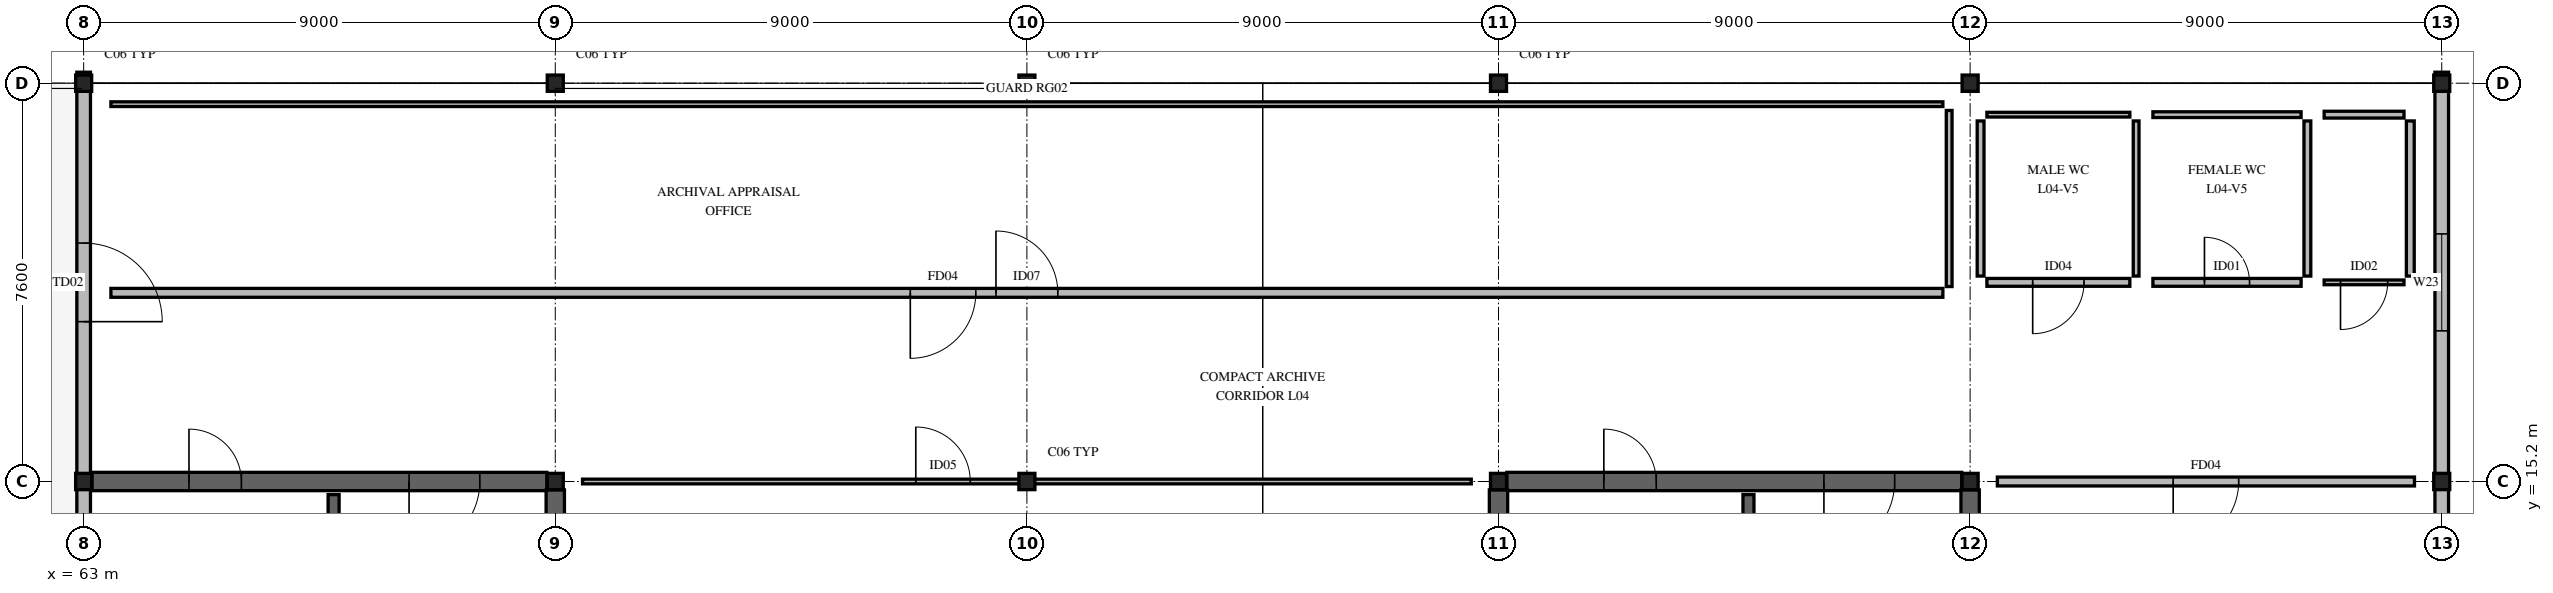
"""IFC4 building model, lengths in metres.
Left out: names, types, materials, properties, quantities, classifications, styles, units other than length and angle.
Written with IfcOpenShell. Run it as: python <this file> out.ifc"""

import sys

from ifc_helpers import new_model, si_unit, direction, frame, frame_2d, origin, origin_2d, place, context, subcontext, project, spatial, rectangle, i_section, extrude, element, fill, save


model = new_model("IFC4")
c1 = context("Model", 3, precision=1e-05, world=origin(), true_north=direction((0.0, 1.0)))
c2 = subcontext(c1, "Body", "Model", "MODEL_VIEW")
j1 = project(units=[si_unit("LENGTHUNIT", "METRE"), si_unit("PLANEANGLEUNIT", "RADIAN")], contexts=[c1])
p1 = place(None, origin())
s1 = spatial("IfcSite", under=j1, at=p1, CompositionType="ELEMENT")
p2 = place(p1, origin())
s2 = spatial("IfcBuilding", under=s1, at=p2, CompositionType="ELEMENT")
p3 = place(p2, frame((0.0, 0.0, 18.0)))
s3 = spatial("IfcBuildingStorey", under=s2, at=p3, CompositionType="ELEMENT", Elevation=18.0)
for number, where, z_axis, x_axis in (
    (1, (63.0, 15.2, 0.0), (0.0, 0.0, 1.0), (1.0, 0.0, 0.0)),
    (2, (63.0, 22.8, 0.0), (0.0, 0.0, 1.0), (1.0, 0.0, 0.0)),
    (3, (72.0, 15.2, 0.0), (0.0, 0.0, 1.0), (1.0, 0.0, 0.0)),
    (4, (72.0, 22.8, 0.0), (0.0, 0.0, 1.0), (1.0, 0.0, 0.0)),
    (5, (81.0, 15.2, 0.0), (0.0, 0.0, 1.0), (1.0, 0.0, 0.0)),
    (6, (81.0, 22.8, 0.0), (0.0, 0.0, 1.0), (1.0, 0.0, 0.0)),
    (7, (90.0, 15.2, 0.0), (0.0, 0.0, 1.0), (1.0, 0.0, 0.0)),
    (8, (90.0, 22.8, 0.0), (0.0, 0.0, 1.0), (1.0, 0.0, 0.0)),
    (9, (99.0, 15.2, 0.0), (0.0, 0.0, 1.0), (1.0, 0.0, 0.0)),
    (10, (99.0, 22.8, 0.0), (0.0, 0.0, 1.0), (1.0, 0.0, 0.0)),
    (11, (108.0, 15.2, 0.0), (0.0, 0.0, 1.0), (1.0, 0.0, 0.0)),
    (12, (108.0, 22.8, 0.0), (0.0, 0.0, 1.0), (1.0, 0.0, 0.0)),
):
    element("IfcColumn", number, at=place(p3, frame(where, z_axis=z_axis, x_axis=x_axis)), inside=s3, PredefinedType="COLUMN", context=c2, shape_type="SweptSolid", body=[
        extrude(i_section(OverallWidth=0.306, OverallDepth=0.311, WebThickness=0.011, FlangeThickness=0.017, FilletRadius=0.015, at=origin_2d()), origin(), (0.0, 0.0, 1.0), 4.32),
    ])
p4 = place(p3, frame((108.0, 7.6, 0.0), z_axis=(0.0, 0.0, 1.0), x_axis=(0.0, 1.0, 0.0)))
e13 = element("IfcWall", 13, at=p4, inside=s3, PredefinedType="STANDARD", context=c2, shape_type="SweptSolid", body=[
    extrude(rectangle(XDim=7.6, YDim=0.26, at=frame_2d((3.8, 0.0))), origin(), (0.0, 0.0, 1.0), 3.629),
])
p5 = place(p4, frame((3.1, 0.0, 0.85)))
e14 = element("IfcOpeningElement", 14, at=p5, cuts=e13, PredefinedType="OPENING", context=c2, shape_type="SweptSolid", body=[
    extrude(rectangle(XDim=1.4, YDim=1.5, at=frame_2d((0.7, 0.75))), frame((0.0, 0.14, 0.0), z_axis=(0.0, -1.0, 0.0), x_axis=(1.0, 0.0, 0.0)), (0.0, 0.0, 1.0), 0.28),
])
p6 = place(p3, frame((63.0, 7.6, 0.0), z_axis=(0.0, 0.0, 1.0), x_axis=(0.0, 1.0, 0.0)))
e15 = element("IfcWall", 15, at=p6, inside=s3, PredefinedType="STANDARD", context=c2, shape_type="SweptSolid", body=[
    extrude(rectangle(XDim=7.6, YDim=0.26, at=frame_2d((3.8, 0.0))), origin(), (0.0, 0.0, 1.0), 3.599),
])
p7 = place(p6, frame((3.025, 0.0, 0.85)))
e16 = element("IfcOpeningElement", 16, at=p7, cuts=e15, PredefinedType="OPENING", context=c2, shape_type="SweptSolid", body=[
    extrude(rectangle(XDim=1.55, YDim=1.5, at=frame_2d((0.775, 0.75))), frame((0.0, 0.14, 0.0), z_axis=(0.0, -1.0, 0.0), x_axis=(1.0, 0.0, 0.0)), (0.0, 0.0, 1.0), 0.28),
])
p8 = place(p3, frame((108.0, 15.2, 0.0), z_axis=(0.0, 0.0, 1.0), x_axis=(0.0, 1.0, 0.0)))
e17 = element("IfcWall", 17, at=p8, inside=s3, PredefinedType="STANDARD", context=c2, shape_type="SweptSolid", body=[
    extrude(rectangle(XDim=7.81, YDim=0.26, at=frame_2d((3.905, 0.0))), origin(), (0.0, 0.0, 1.0), 3.629),
])
p9 = place(p8, frame((2.875, 0.0, 0.85)))
e18 = element("IfcOpeningElement", 18, at=p9, cuts=e17, PredefinedType="OPENING", context=c2, shape_type="SweptSolid", body=[
    extrude(rectangle(XDim=1.85, YDim=1.5, at=frame_2d((0.925, 0.75))), frame((0.0, 0.14, 0.0), z_axis=(0.0, -1.0, 0.0), x_axis=(1.0, 0.0, 0.0)), (0.0, 0.0, 1.0), 0.28),
])
p10 = place(p3, frame((63.0, 15.2, 0.0), z_axis=(0.0, 0.0, 1.0), x_axis=(0.0, 1.0, 0.0)))
e19 = element("IfcWall", 19, at=p10, inside=s3, PredefinedType="STANDARD", context=c2, shape_type="SweptSolid", body=[
    extrude(rectangle(XDim=7.81, YDim=0.26, at=frame_2d((3.905, 0.0))), origin(), (0.0, 0.0, 1.0), 3.599),
])
p11 = place(p10, frame((3.05, 0.0, 0.0)))
e20 = element("IfcOpeningElement", 20, at=p11, cuts=e19, PredefinedType="OPENING", context=c2, shape_type="SweptSolid", body=[
    extrude(rectangle(XDim=1.5, YDim=2.18, at=frame_2d((0.75, 1.09))), frame((0.0, 0.14, 0.0), z_axis=(0.0, -1.0, 0.0), x_axis=(1.0, 0.0, 0.0)), (0.0, 0.0, 1.0), 0.28),
])
p12 = place(p3, frame((63.16, 15.2, 0.0), z_axis=(0.0, 0.0, 1.0), x_axis=(1.0, 0.0, 0.0)))
e21 = element("IfcWall", 21, at=p12, inside=s3, PredefinedType="SHEAR", context=c2, shape_type="SweptSolid", body=[
    extrude(rectangle(XDim=8.68, YDim=0.35, at=frame_2d((4.34, 0.0))), origin(), (0.0, 0.0, 1.0), 4.04),
])
p13 = place(p12, frame((1.85, 0.0, 0.0)))
e22 = element("IfcOpeningElement", 22, at=p13, cuts=e21, PredefinedType="OPENING", context=c2, shape_type="SweptSolid", body=[
    extrude(rectangle(XDim=1.0, YDim=2.15, at=frame_2d((0.5, 1.075))), frame((0.0, 0.185, 0.0), z_axis=(0.0, -1.0, 0.0), x_axis=(1.0, 0.0, 0.0)), (0.0, 0.0, 1.0), 0.37),
])
p14 = place(p12, frame((6.05, 0.0, 0.0)))
e23 = element("IfcOpeningElement", 23, at=p14, cuts=e21, PredefinedType="OPENING", context=c2, shape_type="SweptSolid", body=[
    extrude(rectangle(XDim=1.35, YDim=2.18, at=frame_2d((0.675, 1.09))), frame((0.0, 0.185, 0.0), z_axis=(0.0, -1.0, 0.0), x_axis=(1.0, 0.0, 0.0)), (0.0, 0.0, 1.0), 0.37),
])
p15 = place(p3, frame((72.0, 0.16, 0.0), z_axis=(0.0, 0.0, 1.0), x_axis=(0.0, 1.0, 0.0)))
e24 = element("IfcWall", 24, at=p15, inside=s3, PredefinedType="SHEAR", context=c2, shape_type="SweptSolid", body=[
    extrude(rectangle(XDim=14.88, YDim=0.35, at=frame_2d((7.44, 0.0))), origin(), (0.0, 0.0, 1.0), 4.04),
])
p16 = place(p3, frame((67.77, 4.35, 0.0), z_axis=(0.0, 0.0, 1.0), x_axis=(0.0, 1.0, 0.0)))
e25 = element("IfcWall", 25, at=p16, inside=s3, PredefinedType="SOLIDWALL", context=c2, shape_type="SweptSolid", body=[
    extrude(rectangle(XDim=10.6, YDim=0.21, at=frame_2d((5.3, 0.0))), origin(), (0.0, 0.0, 1.0), 4.04),
])
p17 = place(p3, frame((90.16, 15.2, 0.0), z_axis=(0.0, 0.0, 1.0), x_axis=(1.0, 0.0, 0.0)))
e26 = element("IfcWall", 26, at=p17, inside=s3, PredefinedType="SHEAR", context=c2, shape_type="SweptSolid", body=[
    extrude(rectangle(XDim=8.68, YDim=0.35, at=frame_2d((4.34, 0.0))), origin(), (0.0, 0.0, 1.0), 4.04),
])
p18 = place(p17, frame((1.85, 0.0, 0.0)))
e27 = element("IfcOpeningElement", 27, at=p18, cuts=e26, PredefinedType="OPENING", context=c2, shape_type="SweptSolid", body=[
    extrude(rectangle(XDim=1.0, YDim=2.15, at=frame_2d((0.5, 1.075))), frame((0.0, 0.185, 0.0), z_axis=(0.0, -1.0, 0.0), x_axis=(1.0, 0.0, 0.0)), (0.0, 0.0, 1.0), 0.37),
])
p19 = place(p17, frame((6.05, 0.0, 0.0)))
e28 = element("IfcOpeningElement", 28, at=p19, cuts=e26, PredefinedType="OPENING", context=c2, shape_type="SweptSolid", body=[
    extrude(rectangle(XDim=1.35, YDim=2.18, at=frame_2d((0.675, 1.09))), frame((0.0, 0.185, 0.0), z_axis=(0.0, -1.0, 0.0), x_axis=(1.0, 0.0, 0.0)), (0.0, 0.0, 1.0), 0.37),
])
for number, where, z_axis, x_axis in (
    (29, (90.0, 0.16, 0.0), (0.0, 0.0, 1.0), (0.0, 1.0, 0.0)),
    (30, (99.0, 0.16, 0.0), (0.0, 0.0, 1.0), (0.0, 1.0, 0.0)),
):
    element("IfcWall", number, at=place(p3, frame(where, z_axis=z_axis, x_axis=x_axis)), inside=s3, PredefinedType="SHEAR", context=c2, shape_type="SweptSolid", body=[
        extrude(rectangle(XDim=14.88, YDim=0.35, at=frame_2d((7.44, 0.0))), origin(), (0.0, 0.0, 1.0), 4.04),
    ])
p20 = place(p3, frame((94.77, 4.35, 0.0), z_axis=(0.0, 0.0, 1.0), x_axis=(0.0, 1.0, 0.0)))
e31 = element("IfcWall", 31, at=p20, inside=s3, PredefinedType="SOLIDWALL", context=c2, shape_type="SweptSolid", body=[
    extrude(rectangle(XDim=10.6, YDim=0.21, at=frame_2d((5.3, 0.0))), origin(), (0.0, 0.0, 1.0), 4.04),
])
p21 = place(p3, frame((72.52, 15.2, 0.0), z_axis=(0.0, 0.0, 1.0), x_axis=(1.0, 0.0, 0.0)))
e32 = element("IfcWall", 32, at=p21, inside=s3, PredefinedType="PARTITIONING", context=c2, shape_type="SweptSolid", body=[
    extrude(rectangle(XDim=16.96, YDim=0.09, at=frame_2d((8.48, 0.0))), origin(), (0.0, 0.0, 1.0), 3.524),
])
p22 = place(p21, frame((6.36, 0.0, 0.0)))
e33 = element("IfcOpeningElement", 33, at=p22, cuts=e32, PredefinedType="OPENING", context=c2, shape_type="SweptSolid", body=[
    extrude(rectangle(XDim=1.04, YDim=2.06, at=frame_2d((0.52, 1.03))), frame((0.0, 0.055, 0.0), z_axis=(0.0, -1.0, 0.0), x_axis=(1.0, 0.0, 0.0)), (0.0, 0.0, 1.0), 0.11),
])
p23 = place(p3, frame((99.52, 15.2, 0.0), z_axis=(0.0, 0.0, 1.0), x_axis=(1.0, 0.0, 0.0)))
e34 = element("IfcWall", 34, at=p23, inside=s3, PredefinedType="PARTITIONING", context=c2, shape_type="SweptSolid", body=[
    extrude(rectangle(XDim=7.96, YDim=0.17, at=frame_2d((3.98, 0.0))), origin(), (0.0, 0.0, 1.0), 3.554),
])
p24 = place(p23, frame((3.355, 0.0, 0.0)))
e35 = element("IfcOpeningElement", 35, at=p24, cuts=e34, PredefinedType="OPENING", context=c2, shape_type="SweptSolid", body=[
    extrude(rectangle(XDim=1.25, YDim=2.18, at=frame_2d((0.625, 1.09))), frame((0.0, 0.095, 0.0), z_axis=(0.0, -1.0, 0.0), x_axis=(1.0, 0.0, 0.0)), (0.0, 0.0, 1.0), 0.19),
])
p25 = place(p3, frame((63.52, 18.8, 0.0), z_axis=(0.0, 0.0, 1.0), x_axis=(1.0, 0.0, 0.0)))
e36 = element("IfcWall", 36, at=p25, inside=s3, PredefinedType="PARTITIONING", context=c2, shape_type="SweptSolid", body=[
    extrude(rectangle(XDim=34.96, YDim=0.17, at=frame_2d((17.48, 0.0))), origin(), (0.0, 0.0, 1.0), 4.04),
])
p26 = place(p25, frame((16.89, 0.0, 0.0)))
e37 = element("IfcOpeningElement", 37, at=p26, cuts=e36, PredefinedType="OPENING", context=c2, shape_type="SweptSolid", body=[
    extrude(rectangle(XDim=1.18, YDim=2.06, at=frame_2d((0.59, 1.03))), frame((0.0, 0.095, 0.0), z_axis=(0.0, -1.0, 0.0), x_axis=(1.0, 0.0, 0.0)), (0.0, 0.0, 1.0), 0.19),
])
p27 = place(p25, frame((15.255, 0.0, 0.0)))
e38 = element("IfcOpeningElement", 38, at=p27, cuts=e36, PredefinedType="OPENING", context=c2, shape_type="SweptSolid", body=[
    extrude(rectangle(XDim=1.25, YDim=2.18, at=frame_2d((0.625, 1.09))), frame((0.0, 0.095, 0.0), z_axis=(0.0, -1.0, 0.0), x_axis=(1.0, 0.0, 0.0)), (0.0, 0.0, 1.0), 0.19),
])
p28 = place(p3, frame((98.6, 18.92, 0.0), z_axis=(0.0, 0.0, 1.0), x_axis=(0.0, 1.0, 0.0)))
e39 = element("IfcWall", 39, at=p28, inside=s3, PredefinedType="PARTITIONING", context=c2, shape_type="SweptSolid", body=[
    extrude(rectangle(XDim=3.36, YDim=0.11, at=frame_2d((1.68, 0.0))), origin(), (0.0, 0.0, 1.0), 4.04),
])
p29 = place(p3, frame((63.52, 22.4, 0.0), z_axis=(0.0, 0.0, 1.0), x_axis=(1.0, 0.0, 0.0)))
e40 = element("IfcWall", 40, at=p29, inside=s3, PredefinedType="PARTITIONING", context=c2, shape_type="SweptSolid", body=[
    extrude(rectangle(XDim=34.96, YDim=0.09, at=frame_2d((17.48, 0.0))), origin(), (0.0, 0.0, 1.0), 4.04),
])
p30 = place(p3, frame((99.32, 19.0, 0.0), z_axis=(0.0, 0.0, 1.0), x_axis=(1.0, 0.0, 0.0)))
e41 = element("IfcWall", 41, at=p30, inside=s3, PredefinedType="PARTITIONING", context=c2, shape_type="SweptSolid", body=[
    extrude(rectangle(XDim=2.728, YDim=0.15, at=frame_2d((1.364, 0.0))), origin(), (0.0, 0.0, 1.0), 4.04),
])
p31 = place(p30, frame((0.874, 0.0, 0.0)))
e42 = element("IfcOpeningElement", 42, at=p31, cuts=e41, PredefinedType="OPENING", context=c2, shape_type="SweptSolid", body=[
    extrude(rectangle(XDim=0.98, YDim=2.06, at=frame_2d((0.49, 1.03))), frame((0.0, 0.085, 0.0), z_axis=(0.0, -1.0, 0.0), x_axis=(1.0, 0.0, 0.0)), (0.0, 0.0, 1.0), 0.17),
])
p32 = place(p3, frame((99.2, 19.12, 0.0), z_axis=(0.0, 0.0, 1.0), x_axis=(0.0, 1.0, 0.0)))
e43 = element("IfcWall", 43, at=p32, inside=s3, PredefinedType="PARTITIONING", context=c2, shape_type="SweptSolid", body=[
    extrude(rectangle(XDim=2.96, YDim=0.13, at=frame_2d((1.48, 0.0))), origin(), (0.0, 0.0, 1.0), 3.599),
])
p33 = place(p3, frame((102.168, 19.12, 0.0), z_axis=(0.0, 0.0, 1.0), x_axis=(0.0, 1.0, 0.0)))
e44 = element("IfcWall", 44, at=p33, inside=s3, PredefinedType="PARTITIONING", context=c2, shape_type="SweptSolid", body=[
    extrude(rectangle(XDim=2.96, YDim=0.11, at=frame_2d((1.48, 0.0))), origin(), (0.0, 0.0, 1.0), 4.04),
])
p34 = place(p3, frame((99.32, 22.2, 0.0), z_axis=(0.0, 0.0, 1.0), x_axis=(1.0, 0.0, 0.0)))
e45 = element("IfcWall", 45, at=p34, inside=s3, PredefinedType="PARTITIONING", context=c2, shape_type="SweptSolid", body=[
    extrude(rectangle(XDim=2.728, YDim=0.09, at=frame_2d((1.364, 0.0))), origin(), (0.0, 0.0, 1.0), 4.04),
])
p35 = place(p3, frame((102.488, 19.0, 0.0), z_axis=(0.0, 0.0, 1.0), x_axis=(1.0, 0.0, 0.0)))
e46 = element("IfcWall", 46, at=p35, inside=s3, PredefinedType="PARTITIONING", context=c2, shape_type="SweptSolid", body=[
    extrude(rectangle(XDim=2.828, YDim=0.15, at=frame_2d((1.414, 0.0))), origin(), (0.0, 0.0, 1.0), 4.04),
])
p36 = place(p35, frame((0.984, 0.0, 0.0)))
e47 = element("IfcOpeningElement", 47, at=p36, cuts=e46, PredefinedType="OPENING", context=c2, shape_type="SweptSolid", body=[
    extrude(rectangle(XDim=0.86, YDim=2.06, at=frame_2d((0.43, 1.03))), frame((0.0, 0.085, 0.0), z_axis=(0.0, -1.0, 0.0), x_axis=(1.0, 0.0, 0.0)), (0.0, 0.0, 1.0), 0.17),
])
p37 = place(p3, frame((105.436, 19.12, 0.0), z_axis=(0.0, 0.0, 1.0), x_axis=(0.0, 1.0, 0.0)))
e48 = element("IfcWall", 48, at=p37, inside=s3, PredefinedType="PARTITIONING", context=c2, shape_type="SweptSolid", body=[
    extrude(rectangle(XDim=2.96, YDim=0.13, at=frame_2d((1.48, 0.0))), origin(), (0.0, 0.0, 1.0), 4.04),
])
p38 = place(p3, frame((102.488, 22.2, 0.0), z_axis=(0.0, 0.0, 1.0), x_axis=(1.0, 0.0, 0.0)))
e49 = element("IfcWall", 49, at=p38, inside=s3, PredefinedType="PARTITIONING", context=c2, shape_type="SweptSolid", body=[
    extrude(rectangle(XDim=2.828, YDim=0.11, at=frame_2d((1.414, 0.0))), origin(), (0.0, 0.0, 1.0), 4.04),
])
p39 = place(p3, frame((105.756, 19.0, 0.0), z_axis=(0.0, 0.0, 1.0), x_axis=(1.0, 0.0, 0.0)))
e50 = element("IfcWall", 50, at=p39, inside=s3, PredefinedType="PARTITIONING", context=c2, shape_type="SweptSolid", body=[
    extrude(rectangle(XDim=1.524, YDim=0.09, at=frame_2d((0.762, 0.0))), origin(), (0.0, 0.0, 1.0), 4.04),
])
p40 = place(p39, frame((0.312, 0.0, 0.0)))
e51 = element("IfcOpeningElement", 51, at=p40, cuts=e50, PredefinedType="OPENING", context=c2, shape_type="SweptSolid", body=[
    extrude(rectangle(XDim=0.9, YDim=2.06, at=frame_2d((0.45, 1.03))), frame((0.0, 0.055, 0.0), z_axis=(0.0, -1.0, 0.0), x_axis=(1.0, 0.0, 0.0)), (0.0, 0.0, 1.0), 0.11),
])
p41 = place(p3, frame((107.4, 19.12, 0.0), z_axis=(0.0, 0.0, 1.0), x_axis=(0.0, 1.0, 0.0)))
e52 = element("IfcWall", 52, at=p41, inside=s3, PredefinedType="PARTITIONING", context=c2, shape_type="SweptSolid", body=[
    extrude(rectangle(XDim=2.96, YDim=0.15, at=frame_2d((1.48, 0.0))), origin(), (0.0, 0.0, 1.0), 4.04),
])
p42 = place(p3, frame((105.756, 22.2, 0.0), z_axis=(0.0, 0.0, 1.0), x_axis=(1.0, 0.0, 0.0)))
e53 = element("IfcWall", 53, at=p42, inside=s3, PredefinedType="PARTITIONING", context=c2, shape_type="SweptSolid", body=[
    extrude(rectangle(XDim=1.524, YDim=0.13, at=frame_2d((0.762, 0.0))), origin(), (0.0, 0.0, 1.0), 4.04),
])
p43 = place(p9, origin())
e54 = element("IfcWindow", 54, at=p43, inside=s3, PartitioningType="SINGLE_PANEL", PredefinedType="WINDOW", context=c2, shape_type="SweptSolid", body=[
    extrude(rectangle(XDim=1.85, YDim=1.5, at=frame_2d((0.925, 0.75))), frame((0.0, 0.03, 0.0), z_axis=(0.0, -1.0, 0.0), x_axis=(1.0, 0.0, 0.0)), (0.0, 0.0, 1.0), 0.06),
])
fill(e18, e54)
p44 = place(p11, origin())
e55 = element("IfcDoor", 55, at=p44, inside=s3, OperationType="SINGLE_SWING_RIGHT", PredefinedType="DOOR", context=c2, shape_type="SweptSolid", body=[
    extrude(rectangle(XDim=1.5, YDim=2.18, at=frame_2d((0.75, 1.09))), frame((0.0, 0.025, 0.0), z_axis=(0.0, -1.0, 0.0), x_axis=(1.0, 0.0, 0.0)), (0.0, 0.0, 1.0), 0.05),
])
fill(e20, e55)
p45 = place(p13, origin())
e56 = element("IfcDoor", 56, at=p45, inside=s3, OperationType="SINGLE_SWING_LEFT", PredefinedType="DOOR", context=c2, shape_type="SweptSolid", body=[
    extrude(rectangle(XDim=1.0, YDim=2.15, at=frame_2d((0.5, 1.075))), frame((0.0, 0.025, 0.0), z_axis=(0.0, -1.0, 0.0), x_axis=(1.0, 0.0, 0.0)), (0.0, 0.0, 1.0), 0.05),
])
fill(e22, e56)
p46 = place(p14, origin())
e57 = element("IfcDoor", 57, at=p46, inside=s3, OperationType="SINGLE_SWING_RIGHT", PredefinedType="DOOR", context=c2, shape_type="SweptSolid", body=[
    extrude(rectangle(XDim=1.35, YDim=2.18, at=frame_2d((0.675, 1.09))), frame((0.0, 0.025, 0.0), z_axis=(0.0, -1.0, 0.0), x_axis=(1.0, 0.0, 0.0)), (0.0, 0.0, 1.0), 0.05),
])
fill(e23, e57)
p47 = place(p18, origin())
e58 = element("IfcDoor", 58, at=p47, inside=s3, OperationType="SINGLE_SWING_LEFT", PredefinedType="DOOR", context=c2, shape_type="SweptSolid", body=[
    extrude(rectangle(XDim=1.0, YDim=2.15, at=frame_2d((0.5, 1.075))), frame((0.0, 0.025, 0.0), z_axis=(0.0, -1.0, 0.0), x_axis=(1.0, 0.0, 0.0)), (0.0, 0.0, 1.0), 0.05),
])
fill(e27, e58)
p48 = place(p19, origin())
e59 = element("IfcDoor", 59, at=p48, inside=s3, OperationType="SINGLE_SWING_RIGHT", PredefinedType="DOOR", context=c2, shape_type="SweptSolid", body=[
    extrude(rectangle(XDim=1.35, YDim=2.18, at=frame_2d((0.675, 1.09))), frame((0.0, 0.025, 0.0), z_axis=(0.0, -1.0, 0.0), x_axis=(1.0, 0.0, 0.0)), (0.0, 0.0, 1.0), 0.05),
])
fill(e28, e59)
p49 = place(p22, origin())
e60 = element("IfcDoor", 60, at=p49, inside=s3, OperationType="SINGLE_SWING_LEFT", PredefinedType="DOOR", context=c2, shape_type="SweptSolid", body=[
    extrude(rectangle(XDim=1.04, YDim=2.06, at=frame_2d((0.52, 1.03))), frame((0.0, 0.025, 0.0), z_axis=(0.0, -1.0, 0.0), x_axis=(1.0, 0.0, 0.0)), (0.0, 0.0, 1.0), 0.05),
])
fill(e33, e60)
p50 = place(p24, origin())
e61 = element("IfcDoor", 61, at=p50, inside=s3, OperationType="SINGLE_SWING_RIGHT", PredefinedType="DOOR", context=c2, shape_type="SweptSolid", body=[
    extrude(rectangle(XDim=1.25, YDim=2.18, at=frame_2d((0.625, 1.09))), frame((0.0, 0.025, 0.0), z_axis=(0.0, -1.0, 0.0), x_axis=(1.0, 0.0, 0.0)), (0.0, 0.0, 1.0), 0.05),
])
fill(e35, e61)
p51 = place(p26, origin())
e62 = element("IfcDoor", 62, at=p51, inside=s3, OperationType="SINGLE_SWING_LEFT", PredefinedType="DOOR", context=c2, shape_type="SweptSolid", body=[
    extrude(rectangle(XDim=1.18, YDim=2.06, at=frame_2d((0.59, 1.03))), frame((0.0, 0.025, 0.0), z_axis=(0.0, -1.0, 0.0), x_axis=(1.0, 0.0, 0.0)), (0.0, 0.0, 1.0), 0.05),
])
fill(e37, e62)
p52 = place(p31, origin())
e63 = element("IfcDoor", 63, at=p52, inside=s3, OperationType="SINGLE_SWING_RIGHT", PredefinedType="DOOR", context=c2, shape_type="SweptSolid", body=[
    extrude(rectangle(XDim=0.98, YDim=2.06, at=frame_2d((0.49, 1.03))), frame((0.0, 0.025, 0.0), z_axis=(0.0, -1.0, 0.0), x_axis=(1.0, 0.0, 0.0)), (0.0, 0.0, 1.0), 0.05),
])
fill(e42, e63)
p53 = place(p36, origin())
e64 = element("IfcDoor", 64, at=p53, inside=s3, OperationType="SINGLE_SWING_LEFT", PredefinedType="DOOR", context=c2, shape_type="SweptSolid", body=[
    extrude(rectangle(XDim=0.86, YDim=2.06, at=frame_2d((0.43, 1.03))), frame((0.0, 0.025, 0.0), z_axis=(0.0, -1.0, 0.0), x_axis=(1.0, 0.0, 0.0)), (0.0, 0.0, 1.0), 0.05),
])
fill(e47, e64)
p54 = place(p40, origin())
e65 = element("IfcDoor", 65, at=p54, inside=s3, OperationType="SINGLE_SWING_RIGHT", PredefinedType="DOOR", context=c2, shape_type="SweptSolid", body=[
    extrude(rectangle(XDim=0.9, YDim=2.06, at=frame_2d((0.45, 1.03))), frame((0.0, 0.025, 0.0), z_axis=(0.0, -1.0, 0.0), x_axis=(1.0, 0.0, 0.0)), (0.0, 0.0, 1.0), 0.05),
])
fill(e51, e65)
p55 = place(p27, origin())
e66 = element("IfcDoor", 66, at=p55, inside=s3, OperationType="SINGLE_SWING_RIGHT", PredefinedType="DOOR", context=c2, shape_type="SweptSolid", body=[
    extrude(rectangle(XDim=1.25, YDim=2.18, at=frame_2d((0.625, 1.09))), frame((0.0, 0.025, 0.0), z_axis=(0.0, -1.0, 0.0), x_axis=(1.0, 0.0, 0.0)), (0.0, 0.0, 1.0), 0.05),
])
fill(e38, e66)
save(model, sys.argv[1])
